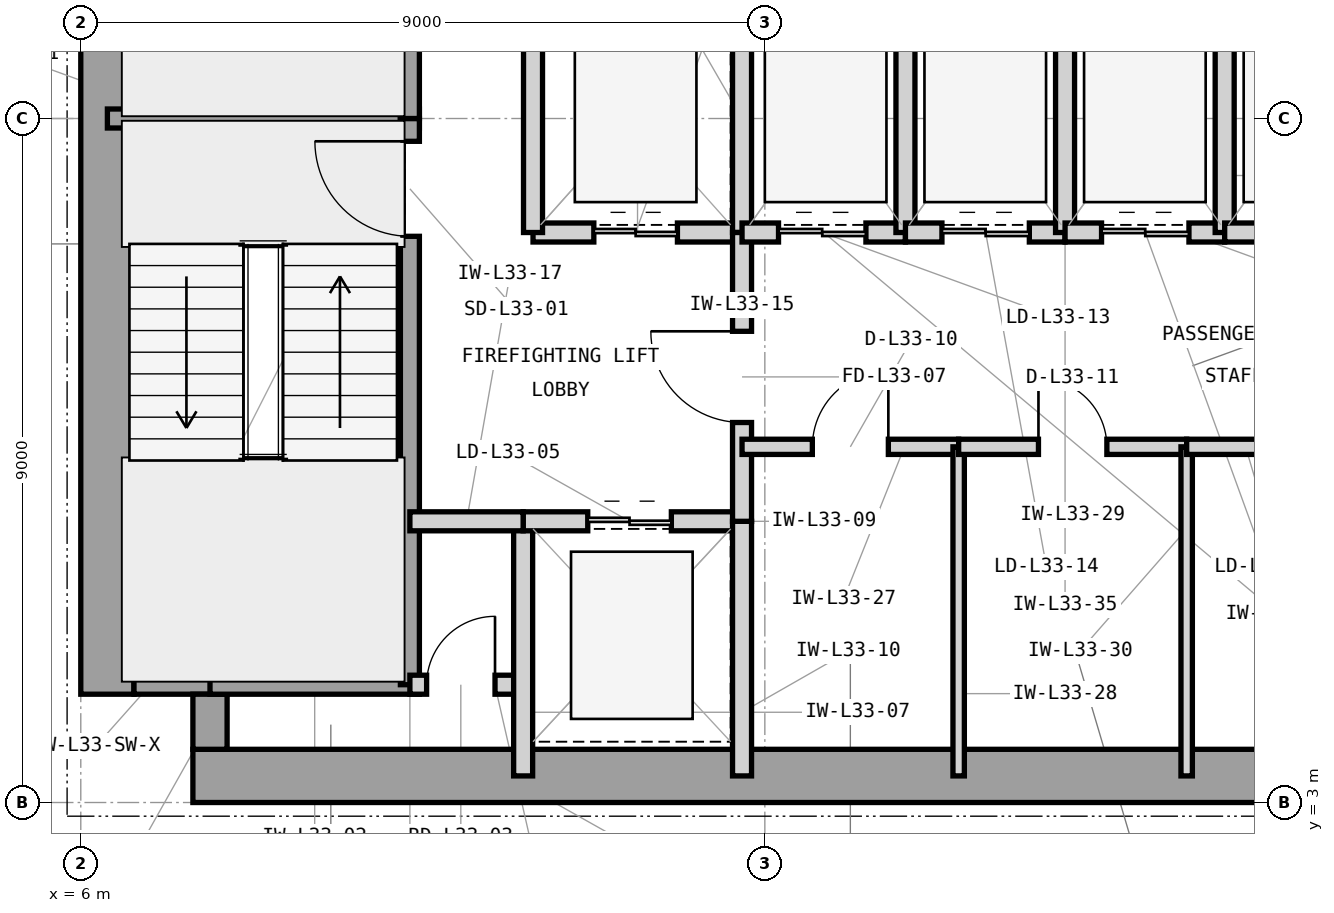
"""IFC4 building model, lengths in metres.
Left out: names, types, materials, properties, quantities, classifications, styles, units other than length and angle.
Written with IfcOpenShell. Run it as: python <this file> out.ifc"""

import sys

from ifc_helpers import new_model, si_unit, direction, frame, frame_2d, origin, place, context, subcontext, project, spatial, rectangle, extrude, element, fill, save


model = new_model("IFC4")
c1 = context("Model", 3, precision=1e-05, world=origin(), true_north=direction((0.0, 1.0)))
c2 = subcontext(c1, "Body", "Model", "MODEL_VIEW")
j1 = project(units=[si_unit("LENGTHUNIT", "METRE"), si_unit("PLANEANGLEUNIT", "RADIAN")], contexts=[c1])
p1 = place(None, origin())
s1 = spatial("IfcSite", under=j1, at=p1, CompositionType="ELEMENT")
p2 = place(p1, origin())
s2 = spatial("IfcBuilding", under=s1, at=p2, CompositionType="ELEMENT")
p3 = place(p2, frame((0.0, 0.0, 140.1)))
s3 = spatial("IfcBuildingStorey", under=s2, at=p3, CompositionType="ELEMENT", Elevation=140.1)
p4 = place(p3, frame((7.475, 3.35, 0.0), z_axis=(0.0, 0.0, 1.0), x_axis=(1.0, 0.0, 0.0)))
e1 = element("IfcWall", 1, at=p4, inside=s3, PredefinedType="SHEAR", context=c2, shape_type="SweptSolid", body=[
    extrude(rectangle(XDim=16.525, YDim=0.7, at=frame_2d((8.262, 0.0))), origin(), (0.0, 0.0, 1.0), 3.9),
])
p5 = place(p3, frame((6.35, 4.425, 0.0), z_axis=(0.0, 0.0, 1.0), x_axis=(0.0, 1.0, 0.0)))
e2 = element("IfcWall", 2, at=p5, inside=s3, PredefinedType="SHEAR", context=c2, shape_type="SweptSolid", body=[
    extrude(rectangle(XDim=15.15, YDim=0.7, at=frame_2d((7.575, 0.0))), origin(), (0.0, 0.0, 1.0), 3.9),
])
p6 = place(p3, frame((6.7, 4.65, 0.0), z_axis=(0.0, 0.0, 1.0), x_axis=(1.0, 0.0, 0.0)))
e3 = element("IfcWall", 3, at=p6, inside=s3, PredefinedType="SHEAR", context=c2, shape_type="SweptSolid", body=[
    extrude(rectangle(XDim=1.225, YDim=0.45, at=frame_2d((0.613, 0.0))), origin(), (0.0, 0.0, 1.0), 3.9),
])
p7 = place(p3, frame((7.7, 3.7, 0.0), z_axis=(0.0, 0.0, 1.0), x_axis=(0.0, 1.0, 0.0)))
e4 = element("IfcWall", 4, at=p7, inside=s3, PredefinedType="SHEAR", context=c2, shape_type="SweptSolid", body=[
    extrude(rectangle(XDim=0.725, YDim=0.45, at=frame_2d((0.363, 0.0))), origin(), (0.0, 0.0, 1.0), 3.9),
])
p8 = place(p3, frame((6.35, 12.0, 0.0), z_axis=(0.0, 0.0, 1.0), x_axis=(1.0, 0.0, 0.0)))
e5 = element("IfcWall", 5, at=p8, inside=s3, PredefinedType="SHEAR", context=c2, shape_type="SweptSolid", body=[
    extrude(rectangle(XDim=4.105, YDim=0.25, at=frame_2d((2.052, 0.0))), origin(), (0.0, 0.0, 1.0), 3.9),
])
p9 = place(p3, frame((7.7, 4.55, 0.0), z_axis=(0.0, 0.0, 1.0), x_axis=(1.0, 0.0, 0.0)))
e6 = element("IfcWall", 6, at=p9, inside=s3, PredefinedType="SHEAR", context=c2, shape_type="SweptSolid", body=[
    extrude(rectangle(XDim=2.755, YDim=0.25, at=frame_2d((1.377, 0.0))), origin(), (0.0, 0.0, 1.0), 3.9),
])
p10 = place(p3, frame((10.33, 4.55, 0.0), z_axis=(0.0, 0.0, 1.0), x_axis=(0.0, 1.0, 0.0)))
e7 = element("IfcWall", 7, at=p10, inside=s3, PredefinedType="SHEAR", context=c2, shape_type="SweptSolid", body=[
    extrude(rectangle(XDim=7.45, YDim=0.25, at=frame_2d((3.725, 0.0))), origin(), (0.0, 0.0, 1.0), 3.9),
])
p11 = place(p10, frame((5.9, 0.0, 0.0)))
e8 = element("IfcOpeningElement", 8, at=p11, cuts=e7, PredefinedType="OPENING", context=c2, shape_type="SweptSolid", body=[
    extrude(rectangle(XDim=1.25, YDim=2.2, at=frame_2d((0.625, 1.1))), frame((0.0, 0.135, 0.0), z_axis=(0.0, -1.0, 0.0), x_axis=(1.0, 0.0, 0.0)), (0.0, 0.0, 1.0), 0.27),
])
p12 = place(p3, frame((10.33, 12.0, 0.0), z_axis=(0.0, 0.0, 1.0), x_axis=(0.0, 1.0, 0.0)))
e9 = element("IfcWall", 9, at=p12, inside=s3, PredefinedType="SHEAR", context=c2, shape_type="SweptSolid", body=[
    extrude(rectangle(XDim=7.45, YDim=0.25, at=frame_2d((3.725, 0.0))), origin(), (0.0, 0.0, 1.0), 3.9),
])
p13 = place(p12, frame((5.85, 0.0, 0.0)))
e10 = element("IfcOpeningElement", 10, at=p13, cuts=e9, PredefinedType="OPENING", context=c2, shape_type="SweptSolid", body=[
    extrude(rectangle(XDim=1.25, YDim=2.2, at=frame_2d((0.625, 1.1))), frame((0.0, 0.135, 0.0), z_axis=(0.0, -1.0, 0.0), x_axis=(1.0, 0.0, 0.0)), (0.0, 0.0, 1.0), 0.27),
])
p14 = place(p3, frame((10.33, 4.55, 0.0), z_axis=(0.0, 0.0, 1.0), x_axis=(1.0, 0.0, 0.0)))
e11 = element("IfcWall", 11, at=p14, inside=s3, PredefinedType="PARTITIONING", context=c2, shape_type="SweptSolid", body=[
    extrude(rectangle(XDim=1.49, YDim=0.25, at=frame_2d((0.745, 0.0))), origin(), (0.0, 0.0, 1.0), 3.69),
])
p15 = place(p14, frame((0.22, 0.0, 0.0)))
e12 = element("IfcOpeningElement", 12, at=p15, cuts=e11, PredefinedType="OPENING", context=c2, shape_type="SweptSolid", body=[
    extrude(rectangle(XDim=0.9, YDim=2.1, at=frame_2d((0.45, 1.05))), frame((0.0, 0.135, 0.0), z_axis=(0.0, -1.0, 0.0), x_axis=(1.0, 0.0, 0.0)), (0.0, 0.0, 1.0), 0.27),
])
p16 = place(p3, frame((11.82, 3.35, 0.0), z_axis=(0.0, 0.0, 1.0), x_axis=(0.0, 1.0, 0.0)))
e13 = element("IfcWall", 13, at=p16, inside=s3, PredefinedType="PARTITIONING", context=c2, shape_type="SweptSolid", body=[
    extrude(rectangle(XDim=3.35, YDim=0.25, at=frame_2d((1.675, 0.0))), origin(), (0.0, 0.0, 1.0), 3.69),
])
p17 = place(p3, frame((11.82, 6.7, 0.0), z_axis=(0.0, 0.0, 1.0), x_axis=(1.0, 0.0, 0.0)))
e14 = element("IfcWall", 14, at=p17, inside=s3, PredefinedType="PARTITIONING", context=c2, shape_type="SweptSolid", body=[
    extrude(rectangle(XDim=2.88, YDim=0.25, at=frame_2d((1.44, 0.0))), origin(), (0.0, 0.0, 1.0), 3.233),
])
p18 = place(p17, frame((0.85, 0.0, 0.0)))
e15 = element("IfcOpeningElement", 15, at=p18, cuts=e14, PredefinedType="OPENING", context=c2, shape_type="SweptSolid", body=[
    extrude(rectangle(XDim=1.1, YDim=2.25, at=frame_2d((0.55, 1.125))), frame((0.0, 0.135, 0.0), z_axis=(0.0, -1.0, 0.0), x_axis=(1.0, 0.0, 0.0)), (0.0, 0.0, 1.0), 0.27),
])
p19 = place(p3, frame((14.7, 3.35, 0.0), z_axis=(0.0, 0.0, 1.0), x_axis=(0.0, 1.0, 0.0)))
e16 = element("IfcWall", 16, at=p19, inside=s3, PredefinedType="PARTITIONING", context=c2, shape_type="SweptSolid", body=[
    extrude(rectangle(XDim=3.35, YDim=0.25, at=frame_2d((1.675, 0.0))), origin(), (0.0, 0.0, 1.0), 3.69),
])
p20 = place(p3, frame((11.95, 10.5, 0.0), z_axis=(0.0, 0.0, 1.0), x_axis=(1.0, 0.0, 0.0)))
e17 = element("IfcWall", 17, at=p20, inside=s3, PredefinedType="PARTITIONING", context=c2, shape_type="SweptSolid", body=[
    extrude(rectangle(XDim=2.75, YDim=0.25, at=frame_2d((1.375, 0.0))), origin(), (0.0, 0.0, 1.0), 3.233),
])
p21 = place(p20, frame((0.8, 0.0, 0.0)))
e18 = element("IfcOpeningElement", 18, at=p21, cuts=e17, PredefinedType="OPENING", context=c2, shape_type="SweptSolid", body=[
    extrude(rectangle(XDim=1.1, YDim=2.25, at=frame_2d((0.55, 1.125))), frame((0.0, 0.135, 0.0), z_axis=(0.0, -1.0, 0.0), x_axis=(1.0, 0.0, 0.0)), (0.0, 0.0, 1.0), 0.27),
])
for number, where, z_axis, x_axis in (
    (19, (11.95, 10.5, 0.0), (0.0, 0.0, 1.0), (0.0, 1.0, 0.0)),
    (20, (14.7, 10.5, 0.0), (0.0, 0.0, 1.0), (0.0, 1.0, 0.0)),
):
    element("IfcWall", number, at=place(p3, frame(where, z_axis=z_axis, x_axis=x_axis)), inside=s3, PredefinedType="PARTITIONING", context=c2, shape_type="SweptSolid", body=[
        extrude(rectangle(XDim=3.0, YDim=0.25, at=frame_2d((1.5, 0.0))), origin(), (0.0, 0.0, 1.0), 3.69),
    ])
p22 = place(p3, frame((14.7, 6.7, 0.0), z_axis=(0.0, 0.0, 1.0), x_axis=(0.0, 1.0, 0.0)))
e21 = element("IfcWall", 21, at=p22, inside=s3, PredefinedType="PARTITIONING", context=c2, shape_type="SweptSolid", body=[
    extrude(rectangle(XDim=3.8, YDim=0.25, at=frame_2d((1.9, 0.0))), origin(), (0.0, 0.0, 1.0), 3.69),
])
p23 = place(p22, frame((1.3, 0.0, 0.0)))
e22 = element("IfcOpeningElement", 22, at=p23, cuts=e21, PredefinedType="OPENING", context=c2, shape_type="SweptSolid", body=[
    extrude(rectangle(XDim=1.2, YDim=2.2, at=frame_2d((0.6, 1.1))), frame((0.0, 0.135, 0.0), z_axis=(0.0, -1.0, 0.0), x_axis=(1.0, 0.0, 0.0)), (0.0, 0.0, 1.0), 0.27),
])
p24 = place(p3, frame((10.33, 6.7, 0.0), z_axis=(0.0, 0.0, 1.0), x_axis=(1.0, 0.0, 0.0)))
e23 = element("IfcWall", 23, at=p24, inside=s3, PredefinedType="PARTITIONING", context=c2, shape_type="SweptSolid", body=[
    extrude(rectangle(XDim=1.49, YDim=0.25, at=frame_2d((0.745, 0.0))), origin(), (0.0, 0.0, 1.0), 3.233),
])
p25 = place(p3, frame((14.7, 7.68, 0.0), z_axis=(0.0, 0.0, 1.0), x_axis=(1.0, 0.0, 0.0)))
e24 = element("IfcWall", 24, at=p25, inside=s3, PredefinedType="PARTITIONING", context=c2, shape_type="SweptSolid", body=[
    extrude(rectangle(XDim=2.85, YDim=0.2, at=frame_2d((1.425, 0.0))), origin(), (0.0, 0.0, 1.0), 3.69),
])
p26 = place(p25, frame((0.925, 0.0, 0.0)))
e25 = element("IfcOpeningElement", 25, at=p26, cuts=e24, PredefinedType="OPENING", context=c2, shape_type="SweptSolid", body=[
    extrude(rectangle(XDim=1.0, YDim=2.15, at=frame_2d((0.5, 1.075))), frame((0.0, 0.11, 0.0), z_axis=(0.0, -1.0, 0.0), x_axis=(1.0, 0.0, 0.0)), (0.0, 0.0, 1.0), 0.22),
])
p27 = place(p3, frame((17.55, 3.35, 0.0), z_axis=(0.0, 0.0, 1.0), x_axis=(0.0, 1.0, 0.0)))
e26 = element("IfcWall", 26, at=p27, inside=s3, PredefinedType="PARTITIONING", context=c2, shape_type="SweptSolid", body=[
    extrude(rectangle(XDim=4.33, YDim=0.15, at=frame_2d((2.165, 0.0))), origin(), (0.0, 0.0, 1.0), 3.69),
])
p28 = place(p3, frame((17.55, 7.68, 0.0), z_axis=(0.0, 0.0, 1.0), x_axis=(1.0, 0.0, 0.0)))
e27 = element("IfcWall", 27, at=p28, inside=s3, PredefinedType="PARTITIONING", context=c2, shape_type="SweptSolid", body=[
    extrude(rectangle(XDim=3.0, YDim=0.2, at=frame_2d((1.5, 0.0))), origin(), (0.0, 0.0, 1.0), 3.69),
])
p29 = place(p28, frame((1.05, 0.0, 0.0)))
e28 = element("IfcOpeningElement", 28, at=p29, cuts=e27, PredefinedType="OPENING", context=c2, shape_type="SweptSolid", body=[
    extrude(rectangle(XDim=0.9, YDim=2.1, at=frame_2d((0.45, 1.05))), frame((0.0, 0.11, 0.0), z_axis=(0.0, -1.0, 0.0), x_axis=(1.0, 0.0, 0.0)), (0.0, 0.0, 1.0), 0.22),
])
p30 = place(p3, frame((20.55, 3.35, 0.0), z_axis=(0.0, 0.0, 1.0), x_axis=(0.0, 1.0, 0.0)))
e29 = element("IfcWall", 29, at=p30, inside=s3, PredefinedType="PARTITIONING", context=c2, shape_type="SweptSolid", body=[
    extrude(rectangle(XDim=4.33, YDim=0.15, at=frame_2d((2.165, 0.0))), origin(), (0.0, 0.0, 1.0), 3.69),
])
p31 = place(p3, frame((20.55, 7.68, 0.0), z_axis=(0.0, 0.0, 1.0), x_axis=(1.0, 0.0, 0.0)))
e30 = element("IfcWall", 30, at=p31, inside=s3, PredefinedType="PARTITIONING", context=c2, shape_type="SweptSolid", body=[
    extrude(rectangle(XDim=3.1, YDim=0.2, at=frame_2d((1.55, 0.0))), origin(), (0.0, 0.0, 1.0), 3.69),
])
p32 = place(p31, frame((1.075, 0.0, 0.0)))
e31 = element("IfcOpeningElement", 31, at=p32, cuts=e30, PredefinedType="OPENING", context=c2, shape_type="SweptSolid", body=[
    extrude(rectangle(XDim=0.95, YDim=2.1, at=frame_2d((0.475, 1.05))), frame((0.0, 0.11, 0.0), z_axis=(0.0, -1.0, 0.0), x_axis=(1.0, 0.0, 0.0)), (0.0, 0.0, 1.0), 0.22),
])
p33 = place(p3, frame((14.7, 10.5, 0.0), z_axis=(0.0, 0.0, 1.0), x_axis=(1.0, 0.0, 0.0)))
e32 = element("IfcWall", 32, at=p33, inside=s3, PredefinedType="PARTITIONING", context=c2, shape_type="SweptSolid", body=[
    extrude(rectangle(XDim=2.15, YDim=0.25, at=frame_2d((1.075, 0.0))), origin(), (0.0, 0.0, 1.0), 3.233),
])
p34 = place(p33, frame((0.48, 0.0, 0.0)))
e33 = element("IfcOpeningElement", 33, at=p34, cuts=e32, PredefinedType="OPENING", context=c2, shape_type="SweptSolid", body=[
    extrude(rectangle(XDim=1.15, YDim=2.25, at=frame_2d((0.575, 1.125))), frame((0.0, 0.135, 0.0), z_axis=(0.0, -1.0, 0.0), x_axis=(1.0, 0.0, 0.0)), (0.0, 0.0, 1.0), 0.27),
])
p35 = place(p3, frame((16.85, 10.5, 0.0), z_axis=(0.0, 0.0, 1.0), x_axis=(0.0, 1.0, 0.0)))
e34 = element("IfcWall", 34, at=p35, inside=s3, PredefinedType="PARTITIONING", context=c2, shape_type="SweptSolid", body=[
    extrude(rectangle(XDim=3.0, YDim=0.25, at=frame_2d((1.5, 0.0))), origin(), (0.0, 0.0, 1.0), 3.69),
])
p36 = place(p3, frame((16.85, 10.5, 0.0), z_axis=(0.0, 0.0, 1.0), x_axis=(1.0, 0.0, 0.0)))
e35 = element("IfcWall", 35, at=p36, inside=s3, PredefinedType="PARTITIONING", context=c2, shape_type="SweptSolid", body=[
    extrude(rectangle(XDim=2.1, YDim=0.25, at=frame_2d((1.05, 0.0))), origin(), (0.0, 0.0, 1.0), 3.233),
])
p37 = place(p36, frame((0.48, 0.0, 0.0)))
e36 = element("IfcOpeningElement", 36, at=p37, cuts=e35, PredefinedType="OPENING", context=c2, shape_type="SweptSolid", body=[
    extrude(rectangle(XDim=1.15, YDim=2.25, at=frame_2d((0.575, 1.125))), frame((0.0, 0.135, 0.0), z_axis=(0.0, -1.0, 0.0), x_axis=(1.0, 0.0, 0.0)), (0.0, 0.0, 1.0), 0.27),
])
p38 = place(p3, frame((18.95, 10.5, 0.0), z_axis=(0.0, 0.0, 1.0), x_axis=(0.0, 1.0, 0.0)))
e37 = element("IfcWall", 37, at=p38, inside=s3, PredefinedType="PARTITIONING", context=c2, shape_type="SweptSolid", body=[
    extrude(rectangle(XDim=3.0, YDim=0.25, at=frame_2d((1.5, 0.0))), origin(), (0.0, 0.0, 1.0), 3.69),
])
p39 = place(p3, frame((18.95, 10.5, 0.0), z_axis=(0.0, 0.0, 1.0), x_axis=(1.0, 0.0, 0.0)))
e38 = element("IfcWall", 38, at=p39, inside=s3, PredefinedType="PARTITIONING", context=c2, shape_type="SweptSolid", body=[
    extrude(rectangle(XDim=2.1, YDim=0.25, at=frame_2d((1.05, 0.0))), origin(), (0.0, 0.0, 1.0), 3.233),
])
p40 = place(p39, frame((0.48, 0.0, 0.0)))
e39 = element("IfcOpeningElement", 39, at=p40, cuts=e38, PredefinedType="OPENING", context=c2, shape_type="SweptSolid", body=[
    extrude(rectangle(XDim=1.15, YDim=2.25, at=frame_2d((0.575, 1.125))), frame((0.0, 0.135, 0.0), z_axis=(0.0, -1.0, 0.0), x_axis=(1.0, 0.0, 0.0)), (0.0, 0.0, 1.0), 0.27),
])
p41 = place(p3, frame((21.05, 10.5, 0.0), z_axis=(0.0, 0.0, 1.0), x_axis=(0.0, 1.0, 0.0)))
e40 = element("IfcWall", 40, at=p41, inside=s3, PredefinedType="PARTITIONING", context=c2, shape_type="SweptSolid", body=[
    extrude(rectangle(XDim=3.0, YDim=0.25, at=frame_2d((1.5, 0.0))), origin(), (0.0, 0.0, 1.0), 3.69),
])
p42 = place(p3, frame((21.05, 10.5, 0.0), z_axis=(0.0, 0.0, 1.0), x_axis=(1.0, 0.0, 0.0)))
e41 = element("IfcWall", 41, at=p42, inside=s3, PredefinedType="PARTITIONING", context=c2, shape_type="SweptSolid", body=[
    extrude(rectangle(XDim=2.4, YDim=0.25, at=frame_2d((1.2, 0.0))), origin(), (0.0, 0.0, 1.0), 3.233),
])
p43 = place(p42, frame((0.48, 0.0, 0.0)))
e42 = element("IfcOpeningElement", 42, at=p43, cuts=e41, PredefinedType="OPENING", context=c2, shape_type="SweptSolid", body=[
    extrude(rectangle(XDim=1.15, YDim=2.25, at=frame_2d((0.575, 1.125))), frame((0.0, 0.135, 0.0), z_axis=(0.0, -1.0, 0.0), x_axis=(1.0, 0.0, 0.0)), (0.0, 0.0, 1.0), 0.27),
])
p44 = place(p11, origin())
e43 = element("IfcDoor", 43, at=p44, inside=s3, OperationType="SINGLE_SWING_RIGHT", PredefinedType="DOOR", context=c2, shape_type="SweptSolid", body=[
    extrude(rectangle(XDim=1.25, YDim=2.2, at=frame_2d((0.625, 1.1))), frame((0.0, 0.025, 0.0), z_axis=(0.0, -1.0, 0.0), x_axis=(1.0, 0.0, 0.0)), (0.0, 0.0, 1.0), 0.05),
])
fill(e8, e43)
p45 = place(p15, origin())
e44 = element("IfcDoor", 44, at=p45, inside=s3, OperationType="SINGLE_SWING_RIGHT", PredefinedType="TRAPDOOR", context=c2, shape_type="SweptSolid", body=[
    extrude(rectangle(XDim=0.9, YDim=2.1, at=frame_2d((0.45, 1.05))), frame((0.0, 0.025, 0.0), z_axis=(0.0, -1.0, 0.0), x_axis=(1.0, 0.0, 0.0)), (0.0, 0.0, 1.0), 0.05),
])
fill(e12, e44)
p46 = place(p18, origin())
e45 = element("IfcDoor", 45, at=p46, inside=s3, OperationType="DOUBLE_DOOR_SLIDING", PredefinedType="DOOR", context=c2, shape_type="SweptSolid", body=[
    extrude(rectangle(XDim=1.1, YDim=2.25, at=frame_2d((0.55, 1.125))), frame((0.0, 0.025, 0.0), z_axis=(0.0, -1.0, 0.0), x_axis=(1.0, 0.0, 0.0)), (0.0, 0.0, 1.0), 0.05),
])
fill(e15, e45)
p47 = place(p21, origin())
e46 = element("IfcDoor", 46, at=p47, inside=s3, OperationType="DOUBLE_DOOR_SLIDING", PredefinedType="DOOR", context=c2, shape_type="SweptSolid", body=[
    extrude(rectangle(XDim=1.1, YDim=2.25, at=frame_2d((0.55, 1.125))), frame((0.0, 0.025, 0.0), z_axis=(0.0, -1.0, 0.0), x_axis=(1.0, 0.0, 0.0)), (0.0, 0.0, 1.0), 0.05),
])
fill(e18, e46)
p48 = place(p23, origin())
e47 = element("IfcDoor", 47, at=p48, inside=s3, OperationType="SINGLE_SWING_RIGHT", PredefinedType="DOOR", context=c2, shape_type="SweptSolid", body=[
    extrude(rectangle(XDim=1.2, YDim=2.2, at=frame_2d((0.6, 1.1))), frame((0.0, 0.025, 0.0), z_axis=(0.0, -1.0, 0.0), x_axis=(1.0, 0.0, 0.0)), (0.0, 0.0, 1.0), 0.05),
])
fill(e22, e47)
p49 = place(p26, origin())
e48 = element("IfcDoor", 48, at=p49, inside=s3, OperationType="SINGLE_SWING_RIGHT", PredefinedType="DOOR", context=c2, shape_type="SweptSolid", body=[
    extrude(rectangle(XDim=1.0, YDim=2.15, at=frame_2d((0.5, 1.075))), frame((0.0, 0.025, 0.0), z_axis=(0.0, -1.0, 0.0), x_axis=(1.0, 0.0, 0.0)), (0.0, 0.0, 1.0), 0.05),
])
fill(e25, e48)
p50 = place(p29, origin())
e49 = element("IfcDoor", 49, at=p50, inside=s3, OperationType="SINGLE_SWING_LEFT", PredefinedType="TRAPDOOR", context=c2, shape_type="SweptSolid", body=[
    extrude(rectangle(XDim=0.9, YDim=2.1, at=frame_2d((0.45, 1.05))), frame((0.0, 0.025, 0.0), z_axis=(0.0, -1.0, 0.0), x_axis=(1.0, 0.0, 0.0)), (0.0, 0.0, 1.0), 0.05),
])
fill(e28, e49)
p51 = place(p34, origin())
e50 = element("IfcDoor", 50, at=p51, inside=s3, OperationType="DOUBLE_DOOR_SLIDING", PredefinedType="DOOR", context=c2, shape_type="SweptSolid", body=[
    extrude(rectangle(XDim=1.15, YDim=2.25, at=frame_2d((0.575, 1.125))), frame((0.0, 0.025, 0.0), z_axis=(0.0, -1.0, 0.0), x_axis=(1.0, 0.0, 0.0)), (0.0, 0.0, 1.0), 0.05),
])
fill(e33, e50)
p52 = place(p37, origin())
e51 = element("IfcDoor", 51, at=p52, inside=s3, OperationType="DOUBLE_DOOR_SLIDING", PredefinedType="DOOR", context=c2, shape_type="SweptSolid", body=[
    extrude(rectangle(XDim=1.15, YDim=2.25, at=frame_2d((0.575, 1.125))), frame((0.0, 0.025, 0.0), z_axis=(0.0, -1.0, 0.0), x_axis=(1.0, 0.0, 0.0)), (0.0, 0.0, 1.0), 0.05),
])
fill(e36, e51)
p53 = place(p40, origin())
e52 = element("IfcDoor", 52, at=p53, inside=s3, OperationType="DOUBLE_DOOR_SLIDING", PredefinedType="DOOR", context=c2, shape_type="SweptSolid", body=[
    extrude(rectangle(XDim=1.15, YDim=2.25, at=frame_2d((0.575, 1.125))), frame((0.0, 0.025, 0.0), z_axis=(0.0, -1.0, 0.0), x_axis=(1.0, 0.0, 0.0)), (0.0, 0.0, 1.0), 0.05),
])
fill(e39, e52)
save(model, sys.argv[1])
